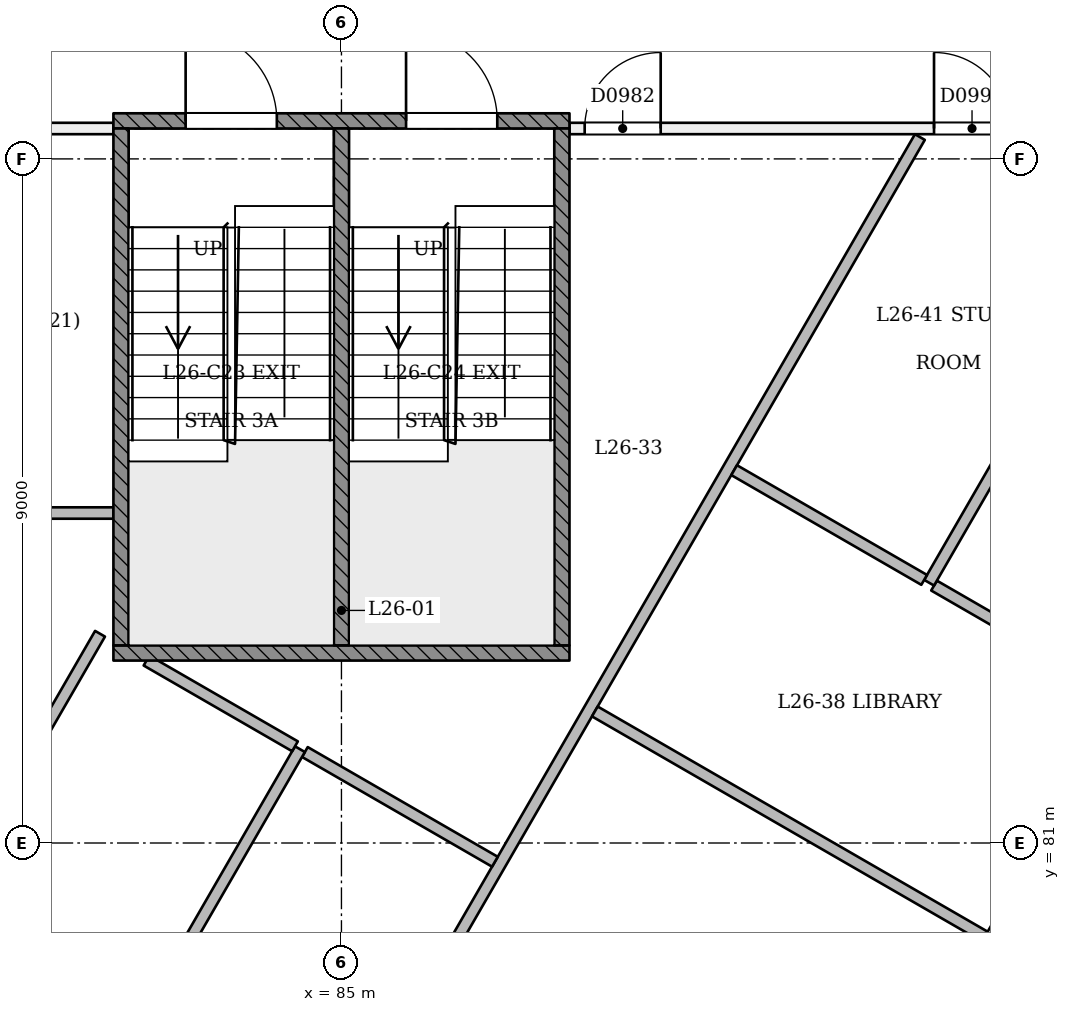
"""IFC4 building model, lengths in metres.
Left out: names, types, materials, properties, quantities, classifications, styles, units other than length and angle.
Written with IfcOpenShell. Run it as: python <this file> out.ifc"""

import sys

from ifc_helpers import new_model, si_unit, direction, frame, frame_2d, origin, place, context, subcontext, project, spatial, rectangle, extrude, element, fill, save


model = new_model("IFC4")
c1 = context("Model", 3, precision=1e-05, world=origin(), true_north=direction((0.0, 1.0)))
c2 = subcontext(c1, "Body", "Model", "MODEL_VIEW")
j1 = project(units=[si_unit("LENGTHUNIT", "METRE"), si_unit("PLANEANGLEUNIT", "RADIAN")], contexts=[c1])
p1 = place(None, origin())
s1 = spatial("IfcSite", under=j1, at=p1, CompositionType="ELEMENT")
p2 = place(p1, origin())
s2 = spatial("IfcBuilding", under=s1, at=p2, CompositionType="ELEMENT")
p3 = place(p2, frame((0.0, 0.0, 104.4)))
s3 = spatial("IfcBuildingStorey", under=s2, at=p3, CompositionType="ELEMENT", Elevation=104.4)
p4 = place(p3, frame((70.441, 90.4, 0.0), z_axis=(0.0, 0.0, 1.0), x_axis=(1.0, 0.0, 0.0)))
e1 = element("IfcWall", 1, at=p4, inside=s3, PredefinedType="PARTITIONING", context=c2, shape_type="SweptSolid", body=[
    extrude(rectangle(XDim=11.559, YDim=0.15, at=frame_2d((5.78, 0.0))), origin(), (0.0, 0.0, 1.0), 3.1),
])
p5 = place(p4, frame((9.535, 0.0, 0.0)))
e2 = element("IfcOpeningElement", 2, at=p5, cuts=e1, PredefinedType="OPENING", context=c2, shape_type="SweptSolid", body=[
    extrude(rectangle(XDim=1.0, YDim=2.1, at=frame_2d((0.5, 1.05))), frame((0.0, 0.085, 0.0), z_axis=(0.0, -1.0, 0.0), x_axis=(1.0, 0.0, 0.0)), (0.0, 0.0, 1.0), 0.171),
])
p6 = place(p4, frame((6.529, 0.0, 0.0)))
e3 = element("IfcOpeningElement", 3, at=p6, cuts=e1, PredefinedType="OPENING", context=c2, shape_type="SweptSolid", body=[
    extrude(rectangle(XDim=1.0, YDim=2.1, at=frame_2d((0.5, 1.05))), frame((0.0, 0.085, 0.0), z_axis=(0.0, -1.0, 0.0), x_axis=(1.0, 0.0, 0.0)), (0.0, 0.0, 1.0), 0.171),
])
p7 = place(p3, frame((63.745, 97.773, 0.0), z_axis=(0.0, 0.0, 1.0), x_axis=(0.500001045382, -0.866024800232, 0.0)))
e4 = element("IfcWall", 4, at=p7, inside=s3, PredefinedType="PARTITIONING", context=c2, shape_type="SweptSolid", body=[
    extrude(rectangle(XDim=41.671, YDim=0.15, at=frame_2d((20.836, 0.0))), origin(), (0.0, 0.0, 1.0), 2.7),
])
p8 = place(p7, frame((2.868, 0.0, 0.0)))
e5 = element("IfcOpeningElement", 5, at=p8, cuts=e4, PredefinedType="OPENING", context=c2, shape_type="SweptSolid", body=[
    extrude(rectangle(XDim=1.2, YDim=2.1, at=frame_2d((0.6, 1.05))), frame((0.0, 0.085, 0.0), z_axis=(0.0, -1.0, 0.0), x_axis=(1.0, 0.0, 0.0)), (0.0, 0.0, 1.0), 0.171),
])
p9 = place(p7, frame((10.115, 0.0, 0.0)))
e6 = element("IfcOpeningElement", 6, at=p9, cuts=e4, PredefinedType="OPENING", context=c2, shape_type="SweptSolid", body=[
    extrude(rectangle(XDim=1.0, YDim=2.1, at=frame_2d((0.5, 1.05))), frame((0.0, 0.085, 0.0), z_axis=(0.0, -1.0, 0.0), x_axis=(1.0, 0.0, 0.0)), (0.0, 0.0, 1.0), 0.171),
])
p10 = place(p7, frame((12.44, 0.0, 0.0)))
e7 = element("IfcOpeningElement", 7, at=p10, cuts=e4, PredefinedType="OPENING", context=c2, shape_type="SweptSolid", body=[
    extrude(rectangle(XDim=1.0, YDim=2.1, at=frame_2d((0.5, 1.05))), frame((0.0, 0.085, 0.0), z_axis=(0.0, -1.0, 0.0), x_axis=(1.0, 0.0, 0.0)), (0.0, 0.0, 1.0), 0.171),
])
p11 = place(p7, frame((19.231, 0.0, 0.0)))
e8 = element("IfcOpeningElement", 8, at=p11, cuts=e4, PredefinedType="OPENING", context=c2, shape_type="SweptSolid", body=[
    extrude(rectangle(XDim=1.0, YDim=2.1, at=frame_2d((0.5, 1.05))), frame((0.0, 0.085, 0.0), z_axis=(0.0, -1.0, 0.0), x_axis=(1.0, 0.0, 0.0)), (0.0, 0.0, 1.0), 0.171),
])
p12 = place(p7, frame((21.556, 0.0, 0.0)))
e9 = element("IfcOpeningElement", 9, at=p12, cuts=e4, PredefinedType="OPENING", context=c2, shape_type="SweptSolid", body=[
    extrude(rectangle(XDim=1.0, YDim=2.1, at=frame_2d((0.5, 1.05))), frame((0.0, 0.085, 0.0), z_axis=(0.0, -1.0, 0.0), x_axis=(1.0, 0.0, 0.0)), (0.0, 0.0, 1.0), 0.171),
])
p13 = place(p7, frame((27.086, 0.0, 0.0)))
e10 = element("IfcOpeningElement", 10, at=p13, cuts=e4, PredefinedType="OPENING", context=c2, shape_type="SweptSolid", body=[
    extrude(rectangle(XDim=1.0, YDim=2.1, at=frame_2d((0.5, 1.05))), frame((0.0, 0.085, 0.0), z_axis=(0.0, -1.0, 0.0), x_axis=(1.0, 0.0, 0.0)), (0.0, 0.0, 1.0), 0.171),
])
p14 = place(p7, frame((30.44, 0.0, 0.0)))
e11 = element("IfcOpeningElement", 11, at=p14, cuts=e4, PredefinedType="OPENING", context=c2, shape_type="SweptSolid", body=[
    extrude(rectangle(XDim=1.0, YDim=2.1, at=frame_2d((0.5, 1.05))), frame((0.0, 0.085, 0.0), z_axis=(0.0, -1.0, 0.0), x_axis=(1.0, 0.0, 0.0)), (0.0, 0.0, 1.0), 0.171),
])
p15 = place(p7, frame((37.619, 0.0, 0.0)))
e12 = element("IfcOpeningElement", 12, at=p15, cuts=e4, PredefinedType="OPENING", context=c2, shape_type="SweptSolid", body=[
    extrude(rectangle(XDim=1.2, YDim=2.1, at=frame_2d((0.6, 1.05))), frame((0.0, 0.085, 0.0), z_axis=(0.0, -1.0, 0.0), x_axis=(1.0, 0.0, 0.0)), (0.0, 0.0, 1.0), 0.171),
])
p16 = place(p3, frame((85.42, 61.685, 0.0), z_axis=(0.0, 0.0, 1.0), x_axis=(0.500001045382, 0.866024800232, 0.0)))
e13 = element("IfcWall", 13, at=p16, inside=s3, PredefinedType="PARTITIONING", context=c2, shape_type="SweptSolid", body=[
    extrude(rectangle(XDim=41.671, YDim=0.15, at=frame_2d((20.836, 0.0))), origin(), (0.0, 0.0, 1.0), 2.7),
])
p17 = place(p16, frame((0.239, 0.0, 0.0)))
e14 = element("IfcOpeningElement", 14, at=p17, cuts=e13, PredefinedType="OPENING", context=c2, shape_type="SweptSolid", body=[
    extrude(rectangle(XDim=1.2, YDim=2.1, at=frame_2d((0.6, 1.05))), frame((0.0, 0.085, 0.0), z_axis=(0.0, -1.0, 0.0), x_axis=(1.0, 0.0, 0.0)), (0.0, 0.0, 1.0), 0.171),
])
p18 = place(p16, frame((5.636, 0.0, 0.0)))
e15 = element("IfcOpeningElement", 15, at=p18, cuts=e13, PredefinedType="OPENING", context=c2, shape_type="SweptSolid", body=[
    extrude(rectangle(XDim=1.2, YDim=2.1, at=frame_2d((0.6, 1.05))), frame((0.0, 0.085, 0.0), z_axis=(0.0, -1.0, 0.0), x_axis=(1.0, 0.0, 0.0)), (0.0, 0.0, 1.0), 0.171),
])
p19 = place(p16, frame((13.586, 0.0, 0.0)))
e16 = element("IfcOpeningElement", 16, at=p19, cuts=e13, PredefinedType="OPENING", context=c2, shape_type="SweptSolid", body=[
    extrude(rectangle(XDim=1.0, YDim=2.1, at=frame_2d((0.5, 1.05))), frame((0.0, 0.085, 0.0), z_axis=(0.0, -1.0, 0.0), x_axis=(1.0, 0.0, 0.0)), (0.0, 0.0, 1.0), 0.171),
])
p20 = place(p16, frame((18.086, 0.0, 0.0)))
e17 = element("IfcOpeningElement", 17, at=p20, cuts=e13, PredefinedType="OPENING", context=c2, shape_type="SweptSolid", body=[
    extrude(rectangle(XDim=1.0, YDim=2.1, at=frame_2d((0.5, 1.05))), frame((0.0, 0.085, 0.0), z_axis=(0.0, -1.0, 0.0), x_axis=(1.0, 0.0, 0.0)), (0.0, 0.0, 1.0), 0.171),
])
p21 = place(p16, frame((21.556, 0.0, 0.0)))
e18 = element("IfcOpeningElement", 18, at=p21, cuts=e13, PredefinedType="OPENING", context=c2, shape_type="SweptSolid", body=[
    extrude(rectangle(XDim=1.0, YDim=2.1, at=frame_2d((0.5, 1.05))), frame((0.0, 0.085, 0.0), z_axis=(0.0, -1.0, 0.0), x_axis=(1.0, 0.0, 0.0)), (0.0, 0.0, 1.0), 0.171),
])
p22 = place(p16, frame((27.086, 0.0, 0.0)))
e19 = element("IfcOpeningElement", 19, at=p22, cuts=e13, PredefinedType="OPENING", context=c2, shape_type="SweptSolid", body=[
    extrude(rectangle(XDim=1.0, YDim=2.1, at=frame_2d((0.5, 1.05))), frame((0.0, 0.085, 0.0), z_axis=(0.0, -1.0, 0.0), x_axis=(1.0, 0.0, 0.0)), (0.0, 0.0, 1.0), 0.171),
])
p23 = place(p16, frame((30.556, 0.0, 0.0)))
e20 = element("IfcOpeningElement", 20, at=p23, cuts=e13, PredefinedType="OPENING", context=c2, shape_type="SweptSolid", body=[
    extrude(rectangle(XDim=1.0, YDim=2.1, at=frame_2d((0.5, 1.05))), frame((0.0, 0.085, 0.0), z_axis=(0.0, -1.0, 0.0), x_axis=(1.0, 0.0, 0.0)), (0.0, 0.0, 1.0), 0.171),
])
p24 = place(p16, frame((37.604, 0.0, 0.0)))
e21 = element("IfcOpeningElement", 21, at=p24, cuts=e13, PredefinedType="OPENING", context=c2, shape_type="SweptSolid", body=[
    extrude(rectangle(XDim=1.2, YDim=2.1, at=frame_2d((0.6, 1.05))), frame((0.0, 0.085, 0.0), z_axis=(0.0, -1.0, 0.0), x_axis=(1.0, 0.0, 0.0)), (0.0, 0.0, 1.0), 0.171),
])
p25 = place(p3, frame((88.0, 90.4, 0.0), z_axis=(0.0, 0.0, 1.0), x_axis=(1.0, 0.0, 0.0)))
e22 = element("IfcWall", 22, at=p25, inside=s3, PredefinedType="PARTITIONING", context=c2, shape_type="SweptSolid", body=[
    extrude(rectangle(XDim=11.559, YDim=0.15, at=frame_2d((5.78, 0.0))), origin(), (0.0, 0.0, 1.0), 3.1),
])
p26 = place(p25, frame((0.2, 0.0, 0.0)))
e23 = element("IfcOpeningElement", 23, at=p26, cuts=e22, PredefinedType="OPENING", context=c2, shape_type="SweptSolid", body=[
    extrude(rectangle(XDim=1.0, YDim=2.1, at=frame_2d((0.5, 1.05))), frame((0.0, 0.085, 0.0), z_axis=(0.0, -1.0, 0.0), x_axis=(1.0, 0.0, 0.0)), (0.0, 0.0, 1.0), 0.171),
])
p27 = place(p25, frame((4.796, 0.0, 0.0)))
e24 = element("IfcOpeningElement", 24, at=p27, cuts=e22, PredefinedType="OPENING", context=c2, shape_type="SweptSolid", body=[
    extrude(rectangle(XDim=1.0, YDim=2.1, at=frame_2d((0.5, 1.05))), frame((0.0, 0.085, 0.0), z_axis=(0.0, -1.0, 0.0), x_axis=(1.0, 0.0, 0.0)), (0.0, 0.0, 1.0), 0.171),
])
p28 = place(p3, frame((99.689, 90.4, 0.0), z_axis=(0.0, 0.0, 1.0), x_axis=(-0.500002079822, -0.866024202995, 0.0)))
e25 = element("IfcWall", 25, at=p28, inside=s3, PredefinedType="PARTITIONING", context=c2, shape_type="SweptSolid", body=[
    extrude(rectangle(XDim=29.249, YDim=0.15, at=frame_2d((14.624, 0.0))), origin(), (0.0, 0.0, 1.0), 3.1),
])
p29 = place(p28, frame((18.65, 0.0, 0.0)))
e26 = element("IfcOpeningElement", 26, at=p29, cuts=e25, PredefinedType="OPENING", context=c2, shape_type="SweptSolid", body=[
    extrude(rectangle(XDim=0.9, YDim=2.1, at=frame_2d((0.45, 1.05))), frame((0.0, 0.085, 0.0), z_axis=(0.0, -1.0, 0.0), x_axis=(1.0, 0.0, 0.0)), (0.0, 0.0, 1.0), 0.171),
])
p30 = place(p28, frame((13.969, 0.0, 0.0)))
e27 = element("IfcOpeningElement", 27, at=p30, cuts=e25, PredefinedType="OPENING", context=c2, shape_type="SweptSolid", body=[
    extrude(rectangle(XDim=1.0, YDim=2.1, at=frame_2d((0.5, 1.05))), frame((0.0, 0.085, 0.0), z_axis=(0.0, -1.0, 0.0), x_axis=(1.0, 0.0, 0.0)), (0.0, 0.0, 1.0), 0.171),
])
p31 = place(p28, frame((4.249, 0.0, 0.0)))
e28 = element("IfcOpeningElement", 28, at=p31, cuts=e25, PredefinedType="OPENING", context=c2, shape_type="SweptSolid", body=[
    extrude(rectangle(XDim=1.0, YDim=2.1, at=frame_2d((0.5, 1.05))), frame((0.0, 0.085, 0.0), z_axis=(0.0, -1.0, 0.0), x_axis=(1.0, 0.0, 0.0)), (0.0, 0.0, 1.0), 0.171),
])
p32 = place(p28, frame((9.987, 0.0, 0.0)))
e29 = element("IfcOpeningElement", 29, at=p32, cuts=e25, PredefinedType="OPENING", context=c2, shape_type="SweptSolid", body=[
    extrude(rectangle(XDim=1.0, YDim=2.1, at=frame_2d((0.5, 1.05))), frame((0.0, 0.085, 0.0), z_axis=(0.0, -1.0, 0.0), x_axis=(1.0, 0.0, 0.0)), (0.0, 0.0, 1.0), 0.171),
])
p33 = place(p3, frame((85.0, 64.958, 0.0), z_axis=(0.0, 0.0, 1.0), x_axis=(-0.500001082908, 0.866024778566, 0.0)))
e30 = element("IfcWall", 30, at=p33, inside=s3, PredefinedType="PARTITIONING", context=c2, shape_type="SweptSolid", body=[
    extrude(rectangle(XDim=29.378, YDim=0.15, at=frame_2d((14.689, 0.0))), origin(), (0.0, 0.0, 1.0), 3.1),
])
p34 = place(p33, frame((20.56, 0.0, 0.0)))
e31 = element("IfcOpeningElement", 31, at=p34, cuts=e30, PredefinedType="OPENING", context=c2, shape_type="SweptSolid", body=[
    extrude(rectangle(XDim=0.9, YDim=2.1, at=frame_2d((0.45, 1.05))), frame((0.0, 0.085, 0.0), z_axis=(0.0, -1.0, 0.0), x_axis=(1.0, 0.0, 0.0)), (0.0, 0.0, 1.0), 0.171),
])
p35 = place(p33, frame((9.401, 0.0, 0.0)))
e32 = element("IfcOpeningElement", 32, at=p35, cuts=e30, PredefinedType="OPENING", context=c2, shape_type="SweptSolid", body=[
    extrude(rectangle(XDim=1.0, YDim=2.1, at=frame_2d((0.5, 1.05))), frame((0.0, 0.085, 0.0), z_axis=(0.0, -1.0, 0.0), x_axis=(1.0, 0.0, 0.0)), (0.0, 0.0, 1.0), 0.171),
])
p36 = place(p33, frame((5.849, 0.0, 0.0)))
e33 = element("IfcOpeningElement", 33, at=p36, cuts=e30, PredefinedType="OPENING", context=c2, shape_type="SweptSolid", body=[
    extrude(rectangle(XDim=1.0, YDim=2.1, at=frame_2d((0.5, 1.05))), frame((0.0, 0.085, 0.0), z_axis=(0.0, -1.0, 0.0), x_axis=(1.0, 0.0, 0.0)), (0.0, 0.0, 1.0), 0.171),
])
p37 = place(p33, frame((17.129, 0.0, 0.0)))
e34 = element("IfcOpeningElement", 34, at=p37, cuts=e30, PredefinedType="OPENING", context=c2, shape_type="SweptSolid", body=[
    extrude(rectangle(XDim=1.2, YDim=2.1, at=frame_2d((0.6, 1.05))), frame((0.0, 0.085, 0.0), z_axis=(0.0, -1.0, 0.0), x_axis=(1.0, 0.0, 0.0)), (0.0, 0.0, 1.0), 0.171),
])
p38 = place(p33, frame((12.854, 0.0, 0.0)))
e35 = element("IfcOpeningElement", 35, at=p38, cuts=e30, PredefinedType="OPENING", context=c2, shape_type="SweptSolid", body=[
    extrude(rectangle(XDim=1.0, YDim=2.1, at=frame_2d((0.5, 1.05))), frame((0.0, 0.085, 0.0), z_axis=(0.0, -1.0, 0.0), x_axis=(1.0, 0.0, 0.0)), (0.0, 0.0, 1.0), 0.171),
])
p39 = place(p33, frame((2.32, 0.0, 0.0)))
e36 = element("IfcOpeningElement", 36, at=p39, cuts=e30, PredefinedType="OPENING", context=c2, shape_type="SweptSolid", body=[
    extrude(rectangle(XDim=1.0, YDim=2.1, at=frame_2d((0.5, 1.05))), frame((0.0, 0.085, 0.0), z_axis=(0.0, -1.0, 0.0), x_axis=(1.0, 0.0, 0.0)), (0.0, 0.0, 1.0), 0.171),
])
p40 = place(p33, frame((25.198, 0.0, 0.0)))
e37 = element("IfcOpeningElement", 37, at=p40, cuts=e30, PredefinedType="OPENING", context=c2, shape_type="SweptSolid", body=[
    extrude(rectangle(XDim=1.0, YDim=2.1, at=frame_2d((0.5, 1.05))), frame((0.0, 0.085, 0.0), z_axis=(0.0, -1.0, 0.0), x_axis=(1.0, 0.0, 0.0)), (0.0, 0.0, 1.0), 0.171),
])
p41 = place(p3, frame((80.811, 85.341, 0.0), z_axis=(0.0, 0.0, 1.0), x_axis=(1.0, 0.0, 0.0)))
e38 = element("IfcWall", 38, at=p41, inside=s3, PredefinedType="PARTITIONING", context=c2, shape_type="SweptSolid", body=[
    extrude(rectangle(XDim=1.189, YDim=0.15, at=frame_2d((0.595, 0.0))), origin(), (0.0, 0.0, 1.0), 3.1),
])
p42 = place(p3, frame((81.558, 71.145, 0.0), z_axis=(0.0, 0.0, 1.0), x_axis=(0.499991429629, 0.866030351834, 0.0)))
e39 = element("IfcWall", 39, at=p42, inside=s3, PredefinedType="PARTITIONING", context=c2, shape_type="SweptSolid", body=[
    extrude(rectangle(XDim=22.104, YDim=0.15, at=frame_2d((11.052, 0.0))), origin(), (0.0, 0.0, 1.0), 3.1),
])
p43 = place(p3, frame((87.019, 80.754, 0.0), z_axis=(0.0, 0.0, 1.0), x_axis=(-0.866027848477, 0.499995765644, 0.0)))
e40 = element("IfcWall", 40, at=p43, inside=s3, PredefinedType="PARTITIONING", context=c2, shape_type="SweptSolid", body=[
    extrude(rectangle(XDim=2.887, YDim=0.15, at=frame_2d((1.443, 0.0))), origin(), (0.0, 0.0, 1.0), 3.1),
])
p44 = place(p3, frame((84.454, 82.234, 0.0), z_axis=(0.0, 0.0, 1.0), x_axis=(-0.500001996123, -0.866024251319, 0.0)))
e41 = element("IfcWall", 41, at=p44, inside=s3, PredefinedType="PARTITIONING", context=c2, shape_type="SweptSolid", body=[
    extrude(rectangle(XDim=9.299, YDim=0.15, at=frame_2d((4.649, 0.0))), origin(), (0.0, 0.0, 1.0), 3.1),
])
p45 = place(p3, frame((82.435, 83.4, 0.0), z_axis=(0.0, 0.0, 1.0), x_axis=(0.866050434864, -0.499956642393, 0.0)))
e42 = element("IfcWall", 42, at=p45, inside=s3, PredefinedType="PARTITIONING", context=c2, shape_type="SweptSolid", body=[
    extrude(rectangle(XDim=2.256, YDim=0.15, at=frame_2d((1.128, 0.0))), origin(), (0.0, 0.0, 1.0), 3.1),
])
p46 = place(p3, frame((78.051, 77.218, 0.0), z_axis=(0.0, 0.0, 1.0), x_axis=(0.500015595758, 0.866016399382, 0.0)))
e43 = element("IfcWall", 43, at=p46, inside=s3, PredefinedType="PARTITIONING", context=c2, shape_type="SweptSolid", body=[
    extrude(rectangle(XDim=7.546, YDim=0.15, at=frame_2d((3.773, 0.0))), origin(), (0.0, 0.0, 1.0), 3.1),
])
p47 = place(p3, frame((93.464, 79.768, 0.0), z_axis=(0.0, 0.0, 1.0), x_axis=(-0.866035989535, 0.499981664495, 0.0)))
e44 = element("IfcWall", 44, at=p47, inside=s3, PredefinedType="PARTITIONING", context=c2, shape_type="SweptSolid", body=[
    extrude(rectangle(XDim=5.925, YDim=0.15, at=frame_2d((2.962, 0.0))), origin(), (0.0, 0.0, 1.0), 3.1),
])
p48 = place(p3, frame((92.796, 84.387, 0.0), z_axis=(0.0, 0.0, 1.0), x_axis=(0.865981426562, -0.500076163049, 0.0)))
e45 = element("IfcWall", 45, at=p48, inside=s3, PredefinedType="PARTITIONING", context=c2, shape_type="SweptSolid", body=[
    extrude(rectangle(XDim=2.888, YDim=0.15, at=frame_2d((1.444, 0.0))), origin(), (0.0, 0.0, 1.0), 3.1),
])
p49 = place(p3, frame((96.116, 90.288, 0.0), z_axis=(0.0, 0.0, 1.0), x_axis=(-0.499994011983, -0.86602886094, 0.0)))
e46 = element("IfcWall", 46, at=p49, inside=s3, PredefinedType="PARTITIONING", context=c2, shape_type="SweptSolid", body=[
    extrude(rectangle(XDim=6.771, YDim=0.15, at=frame_2d((3.385, 0.0))), origin(), (0.0, 0.0, 1.0), 3.1),
])
p50 = place(p3, frame((92.666, 84.462, 0.0), z_axis=(0.0, 0.0, 1.0), x_axis=(-0.866027848477, 0.499995765644, 0.0)))
e47 = element("IfcWall", 47, at=p50, inside=s3, PredefinedType="PARTITIONING", context=c2, shape_type="SweptSolid", body=[
    extrude(rectangle(XDim=2.887, YDim=0.15, at=frame_2d((1.443, 0.0))), origin(), (0.0, 0.0, 1.0), 3.1),
])
p51 = place(p3, frame((82.0, 90.5, 0.0), z_axis=(0.0, 0.0, 1.0), x_axis=(1.0, 0.0, 0.0)))
e48 = element("IfcWall", 48, at=p51, inside=s3, PredefinedType="SOLIDWALL", context=c2, shape_type="SweptSolid", body=[
    extrude(rectangle(XDim=6.0, YDim=0.2, at=frame_2d((3.0, 0.0))), origin(), (0.0, 0.0, 1.0), 3.1),
])
p52 = place(p51, frame((0.95, 0.0, 0.0)))
e49 = element("IfcOpeningElement", 49, at=p52, cuts=e48, PredefinedType="OPENING", context=c2, shape_type="SweptSolid", body=[
    extrude(rectangle(XDim=1.2, YDim=2.1, at=frame_2d((0.6, 1.05))), frame((0.0, 0.11, 0.0), z_axis=(0.0, -1.0, 0.0), x_axis=(1.0, 0.0, 0.0)), (0.0, 0.0, 1.0), 0.221),
])
p53 = place(p51, frame((3.85, 0.0, 0.0)))
e50 = element("IfcOpeningElement", 50, at=p53, cuts=e48, PredefinedType="OPENING", context=c2, shape_type="SweptSolid", body=[
    extrude(rectangle(XDim=1.2, YDim=2.1, at=frame_2d((0.6, 1.05))), frame((0.0, 0.11, 0.0), z_axis=(0.0, -1.0, 0.0), x_axis=(1.0, 0.0, 0.0)), (0.0, 0.0, 1.0), 0.221),
])
p54 = place(p3, frame((82.0, 83.5, 0.0), z_axis=(0.0, 0.0, 1.0), x_axis=(1.0, 0.0, 0.0)))
e51 = element("IfcWall", 51, at=p54, inside=s3, PredefinedType="SOLIDWALL", context=c2, shape_type="SweptSolid", body=[
    extrude(rectangle(XDim=6.0, YDim=0.2, at=frame_2d((3.0, 0.0))), origin(), (0.0, 0.0, 1.0), 3.1),
])
for number, where, z_axis, x_axis in (
    (52, (82.1, 83.6, 0.0), (0.0, 0.0, 1.0), (0.0, 1.0, 0.0)),
    (53, (87.9, 83.6, 0.0), (0.0, 0.0, 1.0), (0.0, 1.0, 0.0)),
    (54, (85.0, 83.6, 0.0), (0.0, 0.0, 1.0), (0.0, 1.0, 0.0)),
):
    element("IfcWall", number, at=place(p3, frame(where, z_axis=z_axis, x_axis=x_axis)), inside=s3, PredefinedType="SOLIDWALL", context=c2, shape_type="SweptSolid", body=[
        extrude(rectangle(XDim=6.8, YDim=0.2, at=frame_2d((3.4, 0.0))), origin(), (0.0, 0.0, 1.0), 3.1),
    ])
p55 = place(p26, origin())
e55 = element("IfcDoor", 55, at=p55, inside=s3, OperationType="SINGLE_SWING_RIGHT", PredefinedType="NOTDEFINED", context=c2, shape_type="SweptSolid", body=[
    extrude(rectangle(XDim=1.0, YDim=2.1, at=frame_2d((0.5, 1.05))), frame((0.0, 0.025, 0.0), z_axis=(0.0, -1.0, 0.0), x_axis=(1.0, 0.0, 0.0)), (0.0, 0.0, 1.0), 0.05),
])
fill(e23, e55)
p56 = place(p27, origin())
e56 = element("IfcDoor", 56, at=p56, inside=s3, OperationType="SINGLE_SWING_LEFT", PredefinedType="NOTDEFINED", context=c2, shape_type="SweptSolid", body=[
    extrude(rectangle(XDim=1.0, YDim=2.1, at=frame_2d((0.5, 1.05))), frame((0.0, 0.025, 0.0), z_axis=(0.0, -1.0, 0.0), x_axis=(1.0, 0.0, 0.0)), (0.0, 0.0, 1.0), 0.05),
])
fill(e24, e56)
p57 = place(p52, origin())
e57 = element("IfcDoor", 57, at=p57, inside=s3, OperationType="SINGLE_SWING_LEFT", PredefinedType="NOTDEFINED", context=c2, shape_type="SweptSolid", body=[
    extrude(rectangle(XDim=1.2, YDim=2.1, at=frame_2d((0.6, 1.05))), frame((0.0, 0.025, 0.0), z_axis=(0.0, -1.0, 0.0), x_axis=(1.0, 0.0, 0.0)), (0.0, 0.0, 1.0), 0.05),
])
fill(e49, e57)
p58 = place(p53, origin())
e58 = element("IfcDoor", 58, at=p58, inside=s3, OperationType="SINGLE_SWING_LEFT", PredefinedType="NOTDEFINED", context=c2, shape_type="SweptSolid", body=[
    extrude(rectangle(XDim=1.2, YDim=2.1, at=frame_2d((0.6, 1.05))), frame((0.0, 0.025, 0.0), z_axis=(0.0, -1.0, 0.0), x_axis=(1.0, 0.0, 0.0)), (0.0, 0.0, 1.0), 0.05),
])
fill(e50, e58)
save(model, sys.argv[1])
